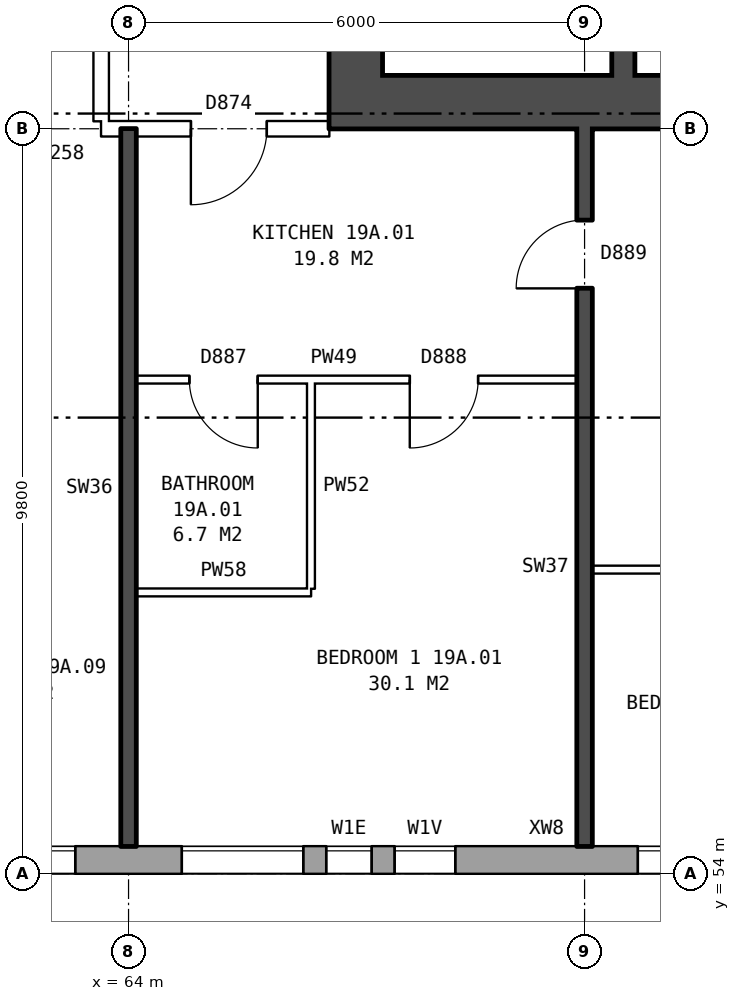
"""IFC4 building model, lengths in metres.
Left out: names, types, materials, properties, quantities, classifications, styles, units other than length and angle.
Written with IfcOpenShell. Run it as: python <this file> out.ifc"""

import sys

from ifc_helpers import new_model, si_unit, direction, frame, frame_2d, origin, place, context, subcontext, project, spatial, rectangle, extrude, element, fill, save


model = new_model("IFC4")
c1 = context("Model", 3, precision=1e-05, world=origin(), true_north=direction((0.0, 1.0)))
c2 = subcontext(c1, "Body", "Model", "MODEL_VIEW")
j1 = project(units=[si_unit("LENGTHUNIT", "METRE"), si_unit("PLANEANGLEUNIT", "RADIAN")], contexts=[c1])
p1 = place(None, origin())
s1 = spatial("IfcSite", under=j1, at=p1, CompositionType="ELEMENT")
p2 = place(p1, origin())
s2 = spatial("IfcBuilding", under=s1, at=p2, CompositionType="ELEMENT")
p3 = place(p2, frame((0.0, 0.0, 71.6)))
s3 = spatial("IfcBuildingStorey", under=s2, at=p3, CompositionType="ELEMENT", Elevation=71.6)
p4 = place(p3, frame((26.325, 54.18, 0.0), z_axis=(0.0, 0.0, 1.0), x_axis=(1.0, 0.0, 0.0)))
e1 = element("IfcWall", 1, at=p4, inside=s3, PredefinedType="STANDARD", context=c2, shape_type="SweptSolid", body=[
    extrude(rectangle(XDim=46.601, YDim=0.36, at=frame_2d((23.3, 0.0))), origin(), (0.0, 0.0, 1.0), 2.85),
])
p5 = place(p4, frame((1.875, 0.0, 1.0)))
e2 = element("IfcOpeningElement", 2, at=p5, cuts=e1, PredefinedType="OPENING", context=c2, shape_type="SweptSolid", body=[
    extrude(rectangle(XDim=0.6, YDim=1.5, at=frame_2d((0.3, 0.75))), frame((0.0, 0.19, 0.0), z_axis=(0.0, -1.0, 0.0), x_axis=(1.0, 0.0, 0.0)), (0.0, 0.0, 1.0), 0.38),
])
p6 = place(p4, frame((5.375, 0.0, 0.8)))
e3 = element("IfcOpeningElement", 3, at=p6, cuts=e1, PredefinedType="OPENING", context=c2, shape_type="SweptSolid", body=[
    extrude(rectangle(XDim=1.6, YDim=1.8, at=frame_2d((0.8, 0.9))), frame((0.0, 0.19, 0.0), z_axis=(0.0, -1.0, 0.0), x_axis=(1.0, 0.0, 0.0)), (0.0, 0.0, 1.0), 0.38),
])
p7 = place(p4, frame((8.375, 0.0, 0.8)))
e4 = element("IfcOpeningElement", 4, at=p7, cuts=e1, PredefinedType="OPENING", context=c2, shape_type="SweptSolid", body=[
    extrude(rectangle(XDim=1.6, YDim=1.8, at=frame_2d((0.8, 0.9))), frame((0.0, 0.19, 0.0), z_axis=(0.0, -1.0, 0.0), x_axis=(1.0, 0.0, 0.0)), (0.0, 0.0, 1.0), 0.38),
])
p8 = place(p4, frame((11.375, 0.0, 0.8)))
e5 = element("IfcOpeningElement", 5, at=p8, cuts=e1, PredefinedType="OPENING", context=c2, shape_type="SweptSolid", body=[
    extrude(rectangle(XDim=1.6, YDim=1.8, at=frame_2d((0.8, 0.9))), frame((0.0, 0.19, 0.0), z_axis=(0.0, -1.0, 0.0), x_axis=(1.0, 0.0, 0.0)), (0.0, 0.0, 1.0), 0.38),
])
p9 = place(p4, frame((14.375, 0.0, 0.8)))
e6 = element("IfcOpeningElement", 6, at=p9, cuts=e1, PredefinedType="OPENING", context=c2, shape_type="SweptSolid", body=[
    extrude(rectangle(XDim=1.6, YDim=1.8, at=frame_2d((0.8, 0.9))), frame((0.0, 0.19, 0.0), z_axis=(0.0, -1.0, 0.0), x_axis=(1.0, 0.0, 0.0)), (0.0, 0.0, 1.0), 0.38),
])
p10 = place(p4, frame((17.375, 0.0, 0.8)))
e7 = element("IfcOpeningElement", 7, at=p10, cuts=e1, PredefinedType="OPENING", context=c2, shape_type="SweptSolid", body=[
    extrude(rectangle(XDim=1.6, YDim=1.8, at=frame_2d((0.8, 0.9))), frame((0.0, 0.19, 0.0), z_axis=(0.0, -1.0, 0.0), x_axis=(1.0, 0.0, 0.0)), (0.0, 0.0, 1.0), 0.38),
])
p11 = place(p4, frame((20.375, 0.0, 0.8)))
e8 = element("IfcOpeningElement", 8, at=p11, cuts=e1, PredefinedType="OPENING", context=c2, shape_type="SweptSolid", body=[
    extrude(rectangle(XDim=1.6, YDim=1.8, at=frame_2d((0.8, 0.9))), frame((0.0, 0.19, 0.0), z_axis=(0.0, -1.0, 0.0), x_axis=(1.0, 0.0, 0.0)), (0.0, 0.0, 1.0), 0.38),
])
p12 = place(p4, frame((23.375, 0.0, 0.8)))
e9 = element("IfcOpeningElement", 9, at=p12, cuts=e1, PredefinedType="OPENING", context=c2, shape_type="SweptSolid", body=[
    extrude(rectangle(XDim=1.6, YDim=1.8, at=frame_2d((0.8, 0.9))), frame((0.0, 0.19, 0.0), z_axis=(0.0, -1.0, 0.0), x_axis=(1.0, 0.0, 0.0)), (0.0, 0.0, 1.0), 0.38),
])
p13 = place(p4, frame((26.375, 0.0, 0.8)))
e10 = element("IfcOpeningElement", 10, at=p13, cuts=e1, PredefinedType="OPENING", context=c2, shape_type="SweptSolid", body=[
    extrude(rectangle(XDim=1.6, YDim=1.8, at=frame_2d((0.8, 0.9))), frame((0.0, 0.19, 0.0), z_axis=(0.0, -1.0, 0.0), x_axis=(1.0, 0.0, 0.0)), (0.0, 0.0, 1.0), 0.38),
])
p14 = place(p4, frame((29.375, 0.0, 0.8)))
e11 = element("IfcOpeningElement", 11, at=p14, cuts=e1, PredefinedType="OPENING", context=c2, shape_type="SweptSolid", body=[
    extrude(rectangle(XDim=1.6, YDim=1.8, at=frame_2d((0.8, 0.9))), frame((0.0, 0.19, 0.0), z_axis=(0.0, -1.0, 0.0), x_axis=(1.0, 0.0, 0.0)), (0.0, 0.0, 1.0), 0.38),
])
p15 = place(p4, frame((32.375, 0.0, 0.8)))
e12 = element("IfcOpeningElement", 12, at=p15, cuts=e1, PredefinedType="OPENING", context=c2, shape_type="SweptSolid", body=[
    extrude(rectangle(XDim=1.6, YDim=1.8, at=frame_2d((0.8, 0.9))), frame((0.0, 0.19, 0.0), z_axis=(0.0, -1.0, 0.0), x_axis=(1.0, 0.0, 0.0)), (0.0, 0.0, 1.0), 0.38),
])
p16 = place(p4, frame((35.375, 0.0, 0.8)))
e13 = element("IfcOpeningElement", 13, at=p16, cuts=e1, PredefinedType="OPENING", context=c2, shape_type="SweptSolid", body=[
    extrude(rectangle(XDim=1.6, YDim=1.8, at=frame_2d((0.8, 0.9))), frame((0.0, 0.19, 0.0), z_axis=(0.0, -1.0, 0.0), x_axis=(1.0, 0.0, 0.0)), (0.0, 0.0, 1.0), 0.38),
])
p17 = place(p4, frame((38.375, 0.0, 0.8)))
e14 = element("IfcOpeningElement", 14, at=p17, cuts=e1, PredefinedType="OPENING", context=c2, shape_type="SweptSolid", body=[
    extrude(rectangle(XDim=1.6, YDim=1.8, at=frame_2d((0.8, 0.9))), frame((0.0, 0.19, 0.0), z_axis=(0.0, -1.0, 0.0), x_axis=(1.0, 0.0, 0.0)), (0.0, 0.0, 1.0), 0.38),
])
p18 = place(p4, frame((40.275, 0.0, 0.8)))
e15 = element("IfcOpeningElement", 15, at=p18, cuts=e1, PredefinedType="OPENING", context=c2, shape_type="SweptSolid", body=[
    extrude(rectangle(XDim=0.6, YDim=1.8, at=frame_2d((0.3, 0.9))), frame((0.0, 0.19, 0.0), z_axis=(0.0, -1.0, 0.0), x_axis=(1.0, 0.0, 0.0)), (0.0, 0.0, 1.0), 0.38),
])
p19 = place(p4, frame((44.375, 0.0, 0.8)))
e16 = element("IfcOpeningElement", 16, at=p19, cuts=e1, PredefinedType="OPENING", context=c2, shape_type="SweptSolid", body=[
    extrude(rectangle(XDim=1.6, YDim=1.8, at=frame_2d((0.8, 0.9))), frame((0.0, 0.19, 0.0), z_axis=(0.0, -1.0, 0.0), x_axis=(1.0, 0.0, 0.0)), (0.0, 0.0, 1.0), 0.38),
])
p20 = place(p4, frame((2.775, 0.0, 1.7)))
e17 = element("IfcOpeningElement", 17, at=p20, cuts=e1, PredefinedType="OPENING", context=c2, shape_type="SweptSolid", body=[
    extrude(rectangle(XDim=0.6, YDim=0.9, at=frame_2d((0.3, 0.45))), frame((0.0, 0.19, 0.0), z_axis=(0.0, -1.0, 0.0), x_axis=(1.0, 0.0, 0.0)), (0.0, 0.0, 1.0), 0.38),
])
p21 = place(p4, frame((41.175, 0.0, 0.8)))
e18 = element("IfcOpeningElement", 18, at=p21, cuts=e1, PredefinedType="OPENING", context=c2, shape_type="SweptSolid", body=[
    extrude(rectangle(XDim=0.8, YDim=0.9, at=frame_2d((0.4, 0.45))), frame((0.0, 0.19, 0.0), z_axis=(0.0, -1.0, 0.0), x_axis=(1.0, 0.0, 0.0)), (0.0, 0.0, 1.0), 0.38),
])
p22 = place(p3, frame((66.99, 64.5, 0.0), z_axis=(0.0, 0.0, 1.0), x_axis=(0.0, 1.0, 0.0)))
e19 = element("IfcWall", 19, at=p22, inside=s3, PredefinedType="SHEAR", context=c2, shape_type="SweptSolid", body=[
    extrude(rectangle(XDim=11.0, YDim=0.7, at=frame_2d((5.5, 0.0))), origin(), (0.0, 0.0, 1.0), 2.85),
])
p23 = place(p22, frame((0.625, 0.0, 0.0)))
e20 = element("IfcOpeningElement", 20, at=p23, cuts=e19, PredefinedType="OPENING", context=c2, shape_type="SweptSolid", body=[
    extrude(rectangle(XDim=1.1, YDim=2.1, at=frame_2d((0.55, 1.05))), frame((0.0, 0.36, 0.0), z_axis=(0.0, -1.0, 0.0), x_axis=(1.0, 0.0, 0.0)), (0.0, 0.0, 1.0), 0.72),
])
p24 = place(p22, frame((9.2, 0.0, 0.0)))
e21 = element("IfcOpeningElement", 21, at=p24, cuts=e19, PredefinedType="OPENING", context=c2, shape_type="SweptSolid", body=[
    extrude(rectangle(XDim=1.1, YDim=2.1, at=frame_2d((0.55, 1.05))), frame((0.0, 0.36, 0.0), z_axis=(0.0, -1.0, 0.0), x_axis=(1.0, 0.0, 0.0)), (0.0, 0.0, 1.0), 0.72),
])
p25 = place(p3, frame((66.64, 64.15, 0.0), z_axis=(0.0, 0.0, 1.0), x_axis=(1.0, 0.0, 0.0)))
e22 = element("IfcWall", 22, at=p25, inside=s3, PredefinedType="SHEAR", context=c2, shape_type="SweptSolid", body=[
    extrude(rectangle(XDim=9.0, YDim=0.7, at=frame_2d((4.5, 0.0))), origin(), (0.0, 0.0, 1.0), 2.85),
])
p26 = place(p3, frame((70.51, 64.5, 0.0), z_axis=(0.0, 0.0, 1.0), x_axis=(0.0, 1.0, 0.0)))
e23 = element("IfcWall", 23, at=p26, inside=s3, PredefinedType="SHEAR", context=c2, shape_type="SweptSolid", body=[
    extrude(rectangle(XDim=2.2, YDim=0.3, at=frame_2d((1.1, 0.0))), origin(), (0.0, 0.0, 1.0), 2.85),
])
p27 = place(p3, frame((63.64, 63.9, 0.0), z_axis=(0.0, 0.0, 1.0), x_axis=(0.0, 1.0, 0.0)))
e24 = element("IfcWall", 24, at=p27, inside=s3, PredefinedType="PARTITIONING", context=c2, shape_type="SweptSolid", body=[
    extrude(rectangle(XDim=12.2, YDim=0.2, at=frame_2d((6.1, 0.0))), origin(), (0.0, 0.0, 1.0), 2.85),
])
p28 = place(p27, frame((5.1, 0.0, 0.0)))
e25 = element("IfcOpeningElement", 25, at=p28, cuts=e24, PredefinedType="OPENING", context=c2, shape_type="SweptSolid", body=[
    extrude(rectangle(XDim=2.0, YDim=2.1, at=frame_2d((1.0, 1.05))), frame((0.0, 0.11, 0.0), z_axis=(0.0, -1.0, 0.0), x_axis=(1.0, 0.0, 0.0)), (0.0, 0.0, 1.0), 0.22),
])
p29 = place(p3, frame((64.1, 57.7, 0.0), z_axis=(0.0, 0.0, 1.0), x_axis=(1.0, 0.0, 0.0)))
e26 = element("IfcWall", 26, at=p29, inside=s3, PredefinedType="PARTITIONING", context=c2, shape_type="SweptSolid", body=[
    extrude(rectangle(XDim=2.3, YDim=0.1, at=frame_2d((1.15, 0.0))), origin(), (0.0, 0.0, 1.0), 2.85),
])
p30 = place(p3, frame((70.1, 58.0, 0.0), z_axis=(0.0, 0.0, 1.0), x_axis=(1.0, 0.0, 0.0)))
e27 = element("IfcWall", 27, at=p30, inside=s3, PredefinedType="PARTITIONING", context=c2, shape_type="SweptSolid", body=[
    extrude(rectangle(XDim=5.54, YDim=0.1, at=frame_2d((2.77, 0.0))), origin(), (0.0, 0.0, 1.0), 2.85),
])
p31 = place(p30, frame((2.32, 0.0, 0.0)))
e28 = element("IfcOpeningElement", 28, at=p31, cuts=e27, PredefinedType="OPENING", context=c2, shape_type="SweptSolid", body=[
    extrude(rectangle(XDim=0.9, YDim=2.1, at=frame_2d((0.45, 1.05))), frame((0.0, 0.06, 0.0), z_axis=(0.0, -1.0, 0.0), x_axis=(1.0, 0.0, 0.0)), (0.0, 0.0, 1.0), 0.12),
])
p32 = place(p3, frame((64.1, 60.5, 0.0), z_axis=(0.0, 0.0, 1.0), x_axis=(1.0, 0.0, 0.0)))
e29 = element("IfcWall", 29, at=p32, inside=s3, PredefinedType="PARTITIONING", context=c2, shape_type="SweptSolid", body=[
    extrude(rectangle(XDim=5.8, YDim=0.1, at=frame_2d((2.9, 0.0))), origin(), (0.0, 0.0, 1.0), 2.85),
])
p33 = place(p32, frame((3.6, 0.0, 0.0)))
e30 = element("IfcOpeningElement", 30, at=p33, cuts=e29, PredefinedType="OPENING", context=c2, shape_type="SweptSolid", body=[
    extrude(rectangle(XDim=0.9, YDim=2.1, at=frame_2d((0.45, 1.05))), frame((0.0, 0.06, 0.0), z_axis=(0.0, -1.0, 0.0), x_axis=(1.0, 0.0, 0.0)), (0.0, 0.0, 1.0), 0.12),
])
p34 = place(p32, frame((0.7, 0.0, 0.0)))
e31 = element("IfcOpeningElement", 31, at=p34, cuts=e29, PredefinedType="OPENING", context=c2, shape_type="SweptSolid", body=[
    extrude(rectangle(XDim=0.9, YDim=2.1, at=frame_2d((0.45, 1.05))), frame((0.0, 0.06, 0.0), z_axis=(0.0, -1.0, 0.0), x_axis=(1.0, 0.0, 0.0)), (0.0, 0.0, 1.0), 0.12),
])
p35 = place(p3, frame((63.64, 63.8, 0.0), z_axis=(0.0, 0.0, 1.0), x_axis=(1.0, 0.0, 0.0)))
e32 = element("IfcWall", 32, at=p35, inside=s3, PredefinedType="PARTITIONING", context=c2, shape_type="SweptSolid", body=[
    extrude(rectangle(XDim=3.0, YDim=0.2, at=frame_2d((1.5, 0.0))), origin(), (0.0, 0.0, 1.0), 2.85),
])
p36 = place(p35, frame((1.18, 0.0, 0.0)))
e33 = element("IfcOpeningElement", 33, at=p36, cuts=e32, PredefinedType="OPENING", context=c2, shape_type="SweptSolid", body=[
    extrude(rectangle(XDim=1.0, YDim=2.1, at=frame_2d((0.5, 1.05))), frame((0.0, 0.11, 0.0), z_axis=(0.0, -1.0, 0.0), x_axis=(1.0, 0.0, 0.0)), (0.0, 0.0, 1.0), 0.22),
])
p37 = place(p3, frame((64.0, 54.36, 0.0), z_axis=(0.0, 0.0, 1.0), x_axis=(0.0, 1.0, 0.0)))
e34 = element("IfcWall", 34, at=p37, inside=s3, PredefinedType="SOLIDWALL", context=c2, shape_type="SweptSolid", body=[
    extrude(rectangle(XDim=9.44, YDim=0.2, at=frame_2d((4.72, 0.0))), origin(), (0.0, 0.0, 1.0), 2.85),
])
p38 = place(p3, frame((66.4, 57.75, 0.0), z_axis=(0.0, 0.0, 1.0), x_axis=(0.0, 1.0, 0.0)))
e35 = element("IfcWall", 35, at=p38, inside=s3, PredefinedType="PARTITIONING", context=c2, shape_type="SweptSolid", body=[
    extrude(rectangle(XDim=2.7, YDim=0.1, at=frame_2d((1.35, 0.0))), origin(), (0.0, 0.0, 1.0), 2.85),
])
p39 = place(p3, frame((70.0, 54.36, 0.0), z_axis=(0.0, 0.0, 1.0), x_axis=(0.0, 1.0, 0.0)))
e36 = element("IfcWall", 36, at=p39, inside=s3, PredefinedType="SOLIDWALL", context=c2, shape_type="SweptSolid", body=[
    extrude(rectangle(XDim=9.44, YDim=0.2, at=frame_2d((4.72, 0.0))), origin(), (0.0, 0.0, 1.0), 2.85),
])
p40 = place(p39, frame((7.34, 0.0, 0.0)))
e37 = element("IfcOpeningElement", 37, at=p40, cuts=e36, PredefinedType="OPENING", context=c2, shape_type="SweptSolid", body=[
    extrude(rectangle(XDim=0.9, YDim=2.1, at=frame_2d((0.45, 1.05))), frame((0.0, 0.11, 0.0), z_axis=(0.0, -1.0, 0.0), x_axis=(1.0, 0.0, 0.0)), (0.0, 0.0, 1.0), 0.22),
])
p41 = place(p16, origin())
e38 = element("IfcWindow", 38, at=p41, inside=s3, PartitioningType="SINGLE_PANEL", PredefinedType="WINDOW", context=c2, shape_type="SweptSolid", body=[
    extrude(rectangle(XDim=1.6, YDim=1.8, at=frame_2d((0.8, 0.9))), frame((0.0, 0.15, 0.0), z_axis=(0.0, -1.0, 0.0), x_axis=(1.0, 0.0, 0.0)), (0.0, 0.0, 1.0), 0.06),
])
fill(e13, e38)
p42 = place(p17, origin())
e39 = element("IfcWindow", 39, at=p42, inside=s3, PartitioningType="SINGLE_PANEL", PredefinedType="WINDOW", context=c2, shape_type="SweptSolid", body=[
    extrude(rectangle(XDim=1.6, YDim=1.8, at=frame_2d((0.8, 0.9))), frame((0.0, 0.15, 0.0), z_axis=(0.0, -1.0, 0.0), x_axis=(1.0, 0.0, 0.0)), (0.0, 0.0, 1.0), 0.06),
])
fill(e14, e39)
p43 = place(p18, origin())
e40 = element("IfcWindow", 40, at=p43, inside=s3, PartitioningType="SINGLE_PANEL", PredefinedType="WINDOW", context=c2, shape_type="SweptSolid", body=[
    extrude(rectangle(XDim=0.6, YDim=1.8, at=frame_2d((0.3, 0.9))), frame((0.0, 0.15, 0.0), z_axis=(0.0, -1.0, 0.0), x_axis=(1.0, 0.0, 0.0)), (0.0, 0.0, 1.0), 0.06),
])
fill(e15, e40)
p44 = place(p19, origin())
e41 = element("IfcWindow", 41, at=p44, inside=s3, PartitioningType="SINGLE_PANEL", PredefinedType="WINDOW", context=c2, shape_type="SweptSolid", body=[
    extrude(rectangle(XDim=1.6, YDim=1.8, at=frame_2d((0.8, 0.9))), frame((0.0, 0.15, 0.0), z_axis=(0.0, -1.0, 0.0), x_axis=(1.0, 0.0, 0.0)), (0.0, 0.0, 1.0), 0.06),
])
fill(e16, e41)
p45 = place(p33, frame((0.9, 0.0, 0.0), z_axis=(0.0, 0.0, 1.0), x_axis=(-1.0, 0.0, 0.0)))
e42 = element("IfcDoor", 42, at=p45, inside=s3, OperationType="SINGLE_SWING_RIGHT", PredefinedType="DOOR", context=c2, shape_type="SweptSolid", body=[
    extrude(rectangle(XDim=0.9, YDim=2.1, at=frame_2d((0.45, 1.05))), frame((0.0, 0.025, 0.0), z_axis=(0.0, -1.0, 0.0), x_axis=(1.0, 0.0, 0.0)), (0.0, 0.0, 1.0), 0.05),
])
fill(e30, e42)
p46 = place(p36, frame((1.0, 0.0, 0.0), z_axis=(0.0, 0.0, 1.0), x_axis=(-1.0, 0.0, 0.0)))
e43 = element("IfcDoor", 43, at=p46, inside=s3, OperationType="SINGLE_SWING_RIGHT", PredefinedType="DOOR", context=c2, shape_type="SweptSolid", body=[
    extrude(rectangle(XDim=1.0, YDim=2.1, at=frame_2d((0.5, 1.05))), frame((0.0, 0.025, 0.0), z_axis=(0.0, -1.0, 0.0), x_axis=(1.0, 0.0, 0.0)), (0.0, 0.0, 1.0), 0.05),
])
fill(e33, e43)
p47 = place(p40, origin())
e44 = element("IfcDoor", 44, at=p47, inside=s3, OperationType="SINGLE_SWING_LEFT", PredefinedType="DOOR", context=c2, shape_type="SweptSolid", body=[
    extrude(rectangle(XDim=0.9, YDim=2.1, at=frame_2d((0.45, 1.05))), frame((0.0, 0.025, 0.0), z_axis=(0.0, -1.0, 0.0), x_axis=(1.0, 0.0, 0.0)), (0.0, 0.0, 1.0), 0.05),
])
fill(e37, e44)
p48 = place(p34, frame((0.9, 0.0, 0.0), z_axis=(0.0, 0.0, 1.0), x_axis=(-1.0, 0.0, 0.0)))
e45 = element("IfcDoor", 45, at=p48, inside=s3, OperationType="SINGLE_SWING_LEFT", PredefinedType="DOOR", context=c2, shape_type="SweptSolid", body=[
    extrude(rectangle(XDim=0.9, YDim=2.1, at=frame_2d((0.45, 1.05))), frame((0.0, 0.025, 0.0), z_axis=(0.0, -1.0, 0.0), x_axis=(1.0, 0.0, 0.0)), (0.0, 0.0, 1.0), 0.05),
])
fill(e31, e45)
p49 = place(p21, origin())
e46 = element("IfcWindow", 46, at=p49, inside=s3, PartitioningType="SINGLE_PANEL", PredefinedType="WINDOW", context=c2, shape_type="SweptSolid", body=[
    extrude(rectangle(XDim=0.8, YDim=0.9, at=frame_2d((0.4, 0.45))), frame((0.0, 0.15, 0.0), z_axis=(0.0, -1.0, 0.0), x_axis=(1.0, 0.0, 0.0)), (0.0, 0.0, 1.0), 0.06),
])
fill(e18, e46)
save(model, sys.argv[1])
